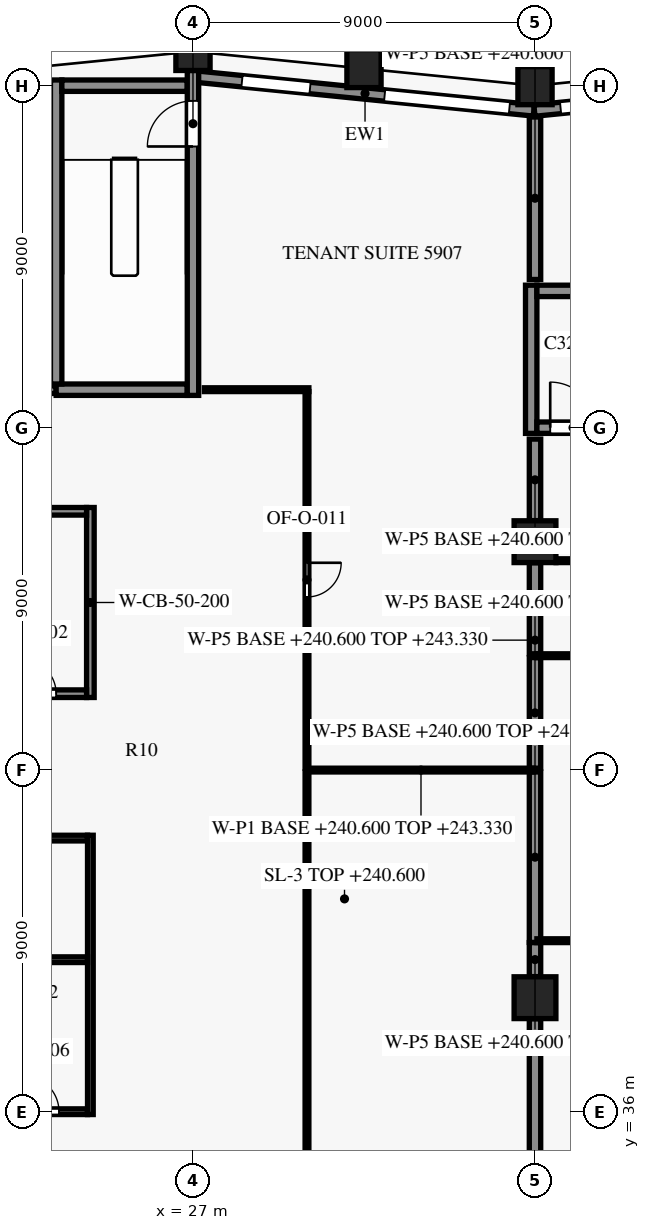
"""IFC4 building model, lengths in metres.
Left out: names, types, materials, properties, quantities, classifications, styles, units other than length and angle.
Written with IfcOpenShell. Run it as: python <this file> out.ifc"""

import sys

from ifc_helpers import new_model, si_unit, direction, frame, frame_2d, origin, origin_2d, place, context, subcontext, project, spatial, rectangle, extrude, element, fill, save


model = new_model("IFC4")
c1 = context("Model", 3, precision=1e-05, world=origin(), true_north=direction((0.0, 1.0)))
c2 = subcontext(c1, "Body", "Model", "MODEL_VIEW")
j1 = project(units=[si_unit("LENGTHUNIT", "METRE"), si_unit("PLANEANGLEUNIT", "RADIAN")], contexts=[c1])
p1 = place(None, origin())
s1 = spatial("IfcSite", under=j1, at=p1, CompositionType="ELEMENT")
p2 = place(p1, origin())
s2 = spatial("IfcBuilding", under=s1, at=p2, CompositionType="ELEMENT")
p3 = place(p2, frame((0.0, 0.0, 240.6)))
s3 = spatial("IfcBuildingStorey", under=s2, at=p3, CompositionType="ELEMENT", Elevation=240.6)
for number, where, z_axis, x_axis in (
    (1, (36.0, 63.0, 0.0), (0.0, 0.0, 1.0), (-1.0, 0.0, 0.0)),
    (2, (31.5, 63.45, 0.0), (0.0, 0.0, 1.0), (-0.995, 0.1, 0.0)),
    (3, (27.0, 63.9, 0.0), (0.0, 0.0, 1.0), (-1.0, 0.0, 0.0)),
):
    element("IfcColumn", number, at=place(p3, frame(where, z_axis=z_axis, x_axis=x_axis)), inside=s3, PredefinedType="COLUMN", context=c2, shape_type="SweptSolid", body=[
        extrude(rectangle(XDim=0.9, YDim=1.0, at=origin_2d()), origin(), (0.0, 0.0, 1.0), 3.8),
    ])
for number, where, z_axis, x_axis in (
    (4, (36.0, 39.0, 0.0), (0.0, 0.0, 1.0), (1.0, 0.0, 0.0)),
    (5, (36.0, 51.0, 0.0), (0.0, 0.0, 1.0), (1.0, 0.0, 0.0)),
):
    element("IfcColumn", number, at=place(p3, frame(where, z_axis=z_axis, x_axis=x_axis)), inside=s3, PredefinedType="COLUMN", context=c2, shape_type="SweptSolid", body=[
        extrude(rectangle(XDim=1.1, YDim=1.1, at=origin_2d()), origin(), (0.0, 0.0, 1.0), 3.8),
    ])
p4 = place(p3, frame((35.985, 62.345, 0.0), z_axis=(0.0, 0.0, 1.0), x_axis=(0.995035316196, 0.099522457379, 0.0)))
e6 = element("IfcWall", 6, at=p4, inside=s3, PredefinedType="SOLIDWALL", context=c2, shape_type="SweptSolid", body=[
    extrude(rectangle(XDim=9.03, YDim=0.3, at=frame_2d((4.515, 0.0))), origin(), (0.0, 0.0, 1.0), 3.15),
])
p5 = place(p4, frame((0.691, 0.0, 0.15)))
e7 = element("IfcOpeningElement", 7, at=p5, cuts=e6, PredefinedType="OPENING", context=c2, shape_type="SweptSolid", body=[
    extrude(rectangle(XDim=3.3, YDim=2.4, at=frame_2d((1.65, 1.2))), frame((0.0, 0.16, 0.0), z_axis=(0.0, -1.0, 0.0), x_axis=(1.0, 0.0, 0.0)), (0.0, 0.0, 1.0), 0.32),
])
p6 = place(p4, frame((5.964, 0.0, 0.75)))
e8 = element("IfcOpeningElement", 8, at=p6, cuts=e6, PredefinedType="OPENING", context=c2, shape_type="SweptSolid", body=[
    extrude(rectangle(XDim=1.8, YDim=1.8, at=frame_2d((0.9, 0.9))), frame((0.0, 0.16, 0.0), z_axis=(0.0, -1.0, 0.0), x_axis=(1.0, 0.0, 0.0)), (0.0, 0.0, 1.0), 0.32),
])
p7 = place(p3, frame((27.085, 63.238, 0.0), z_axis=(0.0, 0.0, 1.0), x_axis=(0.995035836657, -0.099517253618, 0.0)))
e9 = element("IfcWall", 9, at=p7, inside=s3, PredefinedType="SOLIDWALL", context=c2, shape_type="SweptSolid", body=[
    extrude(rectangle(XDim=8.93, YDim=0.3, at=frame_2d((4.465, 0.0))), origin(), (0.0, 0.0, 1.0), 3.15),
])
p8 = place(p7, frame((1.211, 0.0, 0.75)))
e10 = element("IfcOpeningElement", 10, at=p8, cuts=e9, PredefinedType="OPENING", context=c2, shape_type="SweptSolid", body=[
    extrude(rectangle(XDim=1.8, YDim=1.8, at=frame_2d((0.9, 0.9))), frame((0.0, 0.16, 0.0), z_axis=(0.0, -1.0, 0.0), x_axis=(1.0, 0.0, 0.0)), (0.0, 0.0, 1.0), 0.32),
])
p9 = place(p7, frame((4.984, 0.0, 0.15)))
e11 = element("IfcOpeningElement", 11, at=p9, cuts=e9, PredefinedType="OPENING", context=c2, shape_type="SweptSolid", body=[
    extrude(rectangle(XDim=3.3, YDim=2.4, at=frame_2d((1.65, 1.2))), frame((0.0, 0.16, 0.0), z_axis=(0.0, -1.0, 0.0), x_axis=(1.0, 0.0, 0.0)), (0.0, 0.0, 1.0), 0.32),
])
p10 = place(p3, frame((12.4, 36.0, 0.0), z_axis=(0.0, 0.0, 1.0), x_axis=(1.0, 0.0, 0.0)))
e12 = element("IfcWall", 12, at=p10, inside=s3, PredefinedType="SHEAR", context=c2, shape_type="SweptSolid", body=[
    extrude(rectangle(XDim=11.825, YDim=0.15, at=frame_2d((5.913, 0.0))), origin(), (0.0, 0.0, 1.0), 3.5),
])
p11 = place(p10, frame((1.05, 0.0, 0.0)))
e13 = element("IfcOpeningElement", 13, at=p11, cuts=e12, PredefinedType="OPENING", context=c2, shape_type="SweptSolid", body=[
    extrude(rectangle(XDim=0.9, YDim=2.1, at=frame_2d((0.45, 1.05))), frame((0.0, 0.085, 0.0), z_axis=(0.0, -1.0, 0.0), x_axis=(1.0, 0.0, 0.0)), (0.0, 0.0, 1.0), 0.17),
])
p12 = place(p10, frame((4.15, 0.0, 0.0)))
e14 = element("IfcOpeningElement", 14, at=p12, cuts=e12, PredefinedType="OPENING", context=c2, shape_type="SweptSolid", body=[
    extrude(rectangle(XDim=1.0, YDim=2.1, at=frame_2d((0.5, 1.05))), frame((0.0, 0.085, 0.0), z_axis=(0.0, -1.0, 0.0), x_axis=(1.0, 0.0, 0.0)), (0.0, 0.0, 1.0), 0.17),
])
p13 = place(p10, frame((7.35, 0.0, 0.0)))
e15 = element("IfcOpeningElement", 15, at=p13, cuts=e12, PredefinedType="OPENING", context=c2, shape_type="SweptSolid", body=[
    extrude(rectangle(XDim=0.9, YDim=2.1, at=frame_2d((0.45, 1.05))), frame((0.0, 0.085, 0.0), z_axis=(0.0, -1.0, 0.0), x_axis=(1.0, 0.0, 0.0)), (0.0, 0.0, 1.0), 0.17),
])
p14 = place(p10, frame((10.125, 0.0, 0.0)))
e16 = element("IfcOpeningElement", 16, at=p14, cuts=e12, PredefinedType="OPENING", context=c2, shape_type="SweptSolid", body=[
    extrude(rectangle(XDim=0.95, YDim=2.1, at=frame_2d((0.475, 1.05))), frame((0.0, 0.085, 0.0), z_axis=(0.0, -1.0, 0.0), x_axis=(1.0, 0.0, 0.0)), (0.0, 0.0, 1.0), 0.17),
])
p15 = place(p3, frame((8.1, 40.0, 0.0), z_axis=(0.0, 0.0, 1.0), x_axis=(1.0, 0.0, 0.0)))
e17 = element("IfcWall", 17, at=p15, inside=s3, PredefinedType="PARTITIONING", context=c2, shape_type="SweptSolid", body=[
    extrude(rectangle(XDim=16.125, YDim=0.15, at=frame_2d((8.062, 0.0))), origin(), (0.0, 0.0, 1.0), 3.5),
])
p16 = place(p3, frame((8.1, 43.2, 0.0), z_axis=(0.0, 0.0, 1.0), x_axis=(1.0, 0.0, 0.0)))
e18 = element("IfcWall", 18, at=p16, inside=s3, PredefinedType="PARTITIONING", context=c2, shape_type="SweptSolid", body=[
    extrude(rectangle(XDim=16.125, YDim=0.15, at=frame_2d((8.062, 0.0))), origin(), (0.0, 0.0, 1.0), 3.5),
])
p17 = place(p16, frame((1.575, 0.0, 0.0)))
e19 = element("IfcOpeningElement", 19, at=p17, cuts=e18, PredefinedType="OPENING", context=c2, shape_type="SweptSolid", body=[
    extrude(rectangle(XDim=0.9, YDim=2.1, at=frame_2d((0.45, 1.05))), frame((0.0, 0.085, 0.0), z_axis=(0.0, -1.0, 0.0), x_axis=(1.0, 0.0, 0.0)), (0.0, 0.0, 1.0), 0.17),
])
p18 = place(p16, frame((9.675, 0.0, 0.0)))
e20 = element("IfcOpeningElement", 20, at=p18, cuts=e18, PredefinedType="OPENING", context=c2, shape_type="SweptSolid", body=[
    extrude(rectangle(XDim=0.9, YDim=2.1, at=frame_2d((0.45, 1.05))), frame((0.0, 0.085, 0.0), z_axis=(0.0, -1.0, 0.0), x_axis=(1.0, 0.0, 0.0)), (0.0, 0.0, 1.0), 0.17),
])
p19 = place(p3, frame((21.6, 47.0, 0.0), z_axis=(0.0, 0.0, 1.0), x_axis=(1.0, 0.0, 0.0)))
e21 = element("IfcWall", 21, at=p19, inside=s3, PredefinedType="PARTITIONING", context=c2, shape_type="SweptSolid", body=[
    extrude(rectangle(XDim=2.6, YDim=0.2, at=frame_2d((1.3, 0.0))), origin(), (0.0, 0.0, 1.0), 3.5),
])
p20 = place(p19, frame((0.9, 0.0, 0.0)))
e22 = element("IfcOpeningElement", 22, at=p20, cuts=e21, PredefinedType="OPENING", context=c2, shape_type="SweptSolid", body=[
    extrude(rectangle(XDim=0.9, YDim=2.1, at=frame_2d((0.45, 1.05))), frame((0.0, 0.11, 0.0), z_axis=(0.0, -1.0, 0.0), x_axis=(1.0, 0.0, 0.0)), (0.0, 0.0, 1.0), 0.22),
])
p21 = place(p3, frame((21.6, 51.8, 0.0), z_axis=(0.0, 0.0, 1.0), x_axis=(1.0, 0.0, 0.0)))
e23 = element("IfcWall", 23, at=p21, inside=s3, PredefinedType="PARTITIONING", context=c2, shape_type="SweptSolid", body=[
    extrude(rectangle(XDim=2.6, YDim=0.2, at=frame_2d((1.3, 0.0))), origin(), (0.0, 0.0, 1.0), 3.5),
])
p22 = place(p3, frame((36.05, 54.0, 0.0), z_axis=(0.0, 0.0, 1.0), x_axis=(1.0, 0.0, 0.0)))
e24 = element("IfcWall", 24, at=p22, inside=s3, PredefinedType="SHEAR", context=c2, shape_type="SweptSolid", body=[
    extrude(rectangle(XDim=7.7, YDim=0.3, at=frame_2d((3.85, 0.0))), origin(), (0.0, 0.0, 1.0), 3.5),
])
p23 = place(p22, frame((0.35, 0.0, 0.0)))
e25 = element("IfcOpeningElement", 25, at=p23, cuts=e24, PredefinedType="OPENING", context=c2, shape_type="SweptSolid", body=[
    extrude(rectangle(XDim=1.2, YDim=2.2, at=frame_2d((0.6, 1.1))), frame((0.0, 0.16, 0.0), z_axis=(0.0, -1.0, 0.0), x_axis=(1.0, 0.0, 0.0)), (0.0, 0.0, 1.0), 0.32),
])
p24 = place(p3, frame((17.3, 55.0, 0.0), z_axis=(0.0, 0.0, 1.0), x_axis=(1.0, 0.0, 0.0)))
e26 = element("IfcWall", 26, at=p24, inside=s3, PredefinedType="PARTITIONING", context=c2, shape_type="SweptSolid", body=[
    extrude(rectangle(XDim=6.1, YDim=0.2, at=frame_2d((3.05, 0.0))), origin(), (0.0, 0.0, 1.0), 3.5),
])
p25 = place(p24, frame((2.55, 0.0, 0.0)))
e27 = element("IfcOpeningElement", 27, at=p25, cuts=e26, PredefinedType="OPENING", context=c2, shape_type="SweptSolid", body=[
    extrude(rectangle(XDim=1.0, YDim=2.1, at=frame_2d((0.5, 1.05))), frame((0.0, 0.11, 0.0), z_axis=(0.0, -1.0, 0.0), x_axis=(1.0, 0.0, 0.0)), (0.0, 0.0, 1.0), 0.22),
])
p26 = place(p3, frame((23.4, 55.0, 0.0), z_axis=(0.0, 0.0, 1.0), x_axis=(1.0, 0.0, 0.0)))
e28 = element("IfcWall", 28, at=p26, inside=s3, PredefinedType="SHEAR", context=c2, shape_type="SweptSolid", body=[
    extrude(rectangle(XDim=3.45, YDim=0.3, at=frame_2d((1.725, 0.0))), origin(), (0.0, 0.0, 1.0), 3.5),
])
p27 = place(p3, frame((36.05, 57.6, 0.0), z_axis=(0.0, 0.0, 1.0), x_axis=(1.0, 0.0, 0.0)))
e29 = element("IfcWall", 29, at=p27, inside=s3, PredefinedType="SHEAR", context=c2, shape_type="SweptSolid", body=[
    extrude(rectangle(XDim=7.7, YDim=0.3, at=frame_2d((3.85, 0.0))), origin(), (0.0, 0.0, 1.0), 3.5),
])
p28 = place(p3, frame((23.55, 63.0, 0.0), z_axis=(0.0, 0.0, 1.0), x_axis=(1.0, 0.0, 0.0)))
e30 = element("IfcWall", 30, at=p28, inside=s3, PredefinedType="SHEAR", context=c2, shape_type="SweptSolid", body=[
    extrude(rectangle(XDim=3.3, YDim=0.3, at=frame_2d((1.65, 0.0))), origin(), (0.0, 0.0, 1.0), 3.5),
])
p29 = place(p3, frame((23.4, 55.15, 0.0), z_axis=(0.0, 0.0, 1.0), x_axis=(0.0, 1.0, 0.0)))
e31 = element("IfcWall", 31, at=p29, inside=s3, PredefinedType="SHEAR", context=c2, shape_type="SweptSolid", body=[
    extrude(rectangle(XDim=8.0, YDim=0.3, at=frame_2d((4.0, 0.0))), origin(), (0.0, 0.0, 1.0), 3.5),
])
p30 = place(p3, frame((24.3, 35.925, 0.0), z_axis=(0.0, 0.0, 1.0), x_axis=(0.0, 1.0, 0.0)))
e32 = element("IfcWall", 32, at=p30, inside=s3, PredefinedType="PARTITIONING", context=c2, shape_type="SweptSolid", body=[
    extrude(rectangle(XDim=7.35, YDim=0.15, at=frame_2d((3.675, 0.0))), origin(), (0.0, 0.0, 1.0), 3.5),
])
p31 = place(p3, frame((24.3, 46.9, 0.0), z_axis=(0.0, 0.0, 1.0), x_axis=(0.0, 1.0, 0.0)))
e33 = element("IfcWall", 33, at=p31, inside=s3, PredefinedType="SHEAR", context=c2, shape_type="SweptSolid", body=[
    extrude(rectangle(XDim=5.0, YDim=0.2, at=frame_2d((2.5, 0.0))), origin(), (0.0, 0.0, 1.0), 3.5),
])
p32 = place(p3, frame((27.0, 54.85, 0.0), z_axis=(0.0, 0.0, 1.0), x_axis=(0.0, 1.0, 0.0)))
e34 = element("IfcWall", 34, at=p32, inside=s3, PredefinedType="SHEAR", context=c2, shape_type="SweptSolid", body=[
    extrude(rectangle(XDim=8.55, YDim=0.3, at=frame_2d((4.275, 0.0))), origin(), (0.0, 0.0, 1.0), 3.5),
])
p33 = place(p32, frame((6.55, 0.0, 0.0)))
e35 = element("IfcOpeningElement", 35, at=p33, cuts=e34, PredefinedType="OPENING", context=c2, shape_type="SweptSolid", body=[
    extrude(rectangle(XDim=1.2, YDim=2.2, at=frame_2d((0.6, 1.1))), frame((0.0, 0.16, 0.0), z_axis=(0.0, -1.0, 0.0), x_axis=(1.0, 0.0, 0.0)), (0.0, 0.0, 1.0), 0.32),
])
p34 = place(p3, frame((35.9, 53.85, 0.0), z_axis=(0.0, 0.0, 1.0), x_axis=(0.0, 1.0, 0.0)))
e36 = element("IfcWall", 36, at=p34, inside=s3, PredefinedType="SHEAR", context=c2, shape_type="SweptSolid", body=[
    extrude(rectangle(XDim=3.9, YDim=0.3, at=frame_2d((1.95, 0.0))), origin(), (0.0, 0.0, 1.0), 3.5),
])
p35 = place(p3, frame((36.0, 27.824, 0.0), z_axis=(0.0, 0.0, 1.0), x_axis=(0.0, 1.0, 0.0)))
e37 = element("IfcWall", 37, at=p35, inside=s3, PredefinedType="PARTITIONING", context=c2, shape_type="SweptSolid", body=[
    extrude(rectangle(XDim=10.621, YDim=0.3, at=frame_2d((5.311, 0.0))), origin(), (0.0, 0.0, 1.0), 2.73),
])
p36 = place(p3, frame((36.0, 39.555, 0.0), z_axis=(0.0, 0.0, 1.0), x_axis=(0.0, 1.0, 0.0)))
e38 = element("IfcWall", 38, at=p36, inside=s3, PredefinedType="PARTITIONING", context=c2, shape_type="SweptSolid", body=[
    extrude(rectangle(XDim=0.895, YDim=0.3, at=frame_2d((0.448, 0.0))), origin(), (0.0, 0.0, 1.0), 2.73),
])
p37 = place(p3, frame((49.45, 40.5, 0.0), z_axis=(0.0, 0.0, 1.0), x_axis=(-1.0, 0.0, 0.0)))
e39 = element("IfcWall", 39, at=p37, inside=s3, PredefinedType="PARTITIONING", context=c2, shape_type="SweptSolid", body=[
    extrude(rectangle(XDim=13.4, YDim=0.1, at=frame_2d((6.7, 0.0))), origin(), (0.0, 0.0, 1.0), 2.73),
])
p38 = place(p37, frame((8.05, 0.0, 0.0)))
e40 = element("IfcOpeningElement", 40, at=p38, cuts=e39, PredefinedType="OPENING", context=c2, shape_type="SweptSolid", body=[
    extrude(rectangle(XDim=1.8, YDim=2.1, at=frame_2d((0.9, 1.05))), frame((0.0, 0.06, 0.0), z_axis=(0.0, -1.0, 0.0), x_axis=(1.0, 0.0, 0.0)), (0.0, 0.0, 1.0), 0.12),
])
p39 = place(p3, frame((36.0, 40.455, 0.0), z_axis=(0.0, 0.0, 1.0), x_axis=(0.0, 1.0, 0.0)))
e41 = element("IfcWall", 41, at=p39, inside=s3, PredefinedType="PARTITIONING", context=c2, shape_type="SweptSolid", body=[
    extrude(rectangle(XDim=4.485, YDim=0.3, at=frame_2d((2.242, 0.0))), origin(), (0.0, 0.0, 1.0), 2.73),
])
p40 = place(p3, frame((30.0, 44.94, 0.0), z_axis=(0.0, 0.0, 1.0), x_axis=(0.0, -1.0, 0.0)))
e42 = element("IfcWall", 42, at=p40, inside=s3, PredefinedType="PARTITIONING", context=c2, shape_type="SweptSolid", body=[
    extrude(rectangle(XDim=11.89, YDim=0.1, at=frame_2d((5.945, 0.0))), origin(), (0.0, 0.0, 1.0), 3.33),
])
p41 = place(p3, frame((30.05, 44.99, 0.0), z_axis=(0.0, 0.0, 1.0), x_axis=(1.0, 0.0, 0.0)))
e43 = element("IfcWall", 43, at=p41, inside=s3, PredefinedType="PARTITIONING", context=c2, shape_type="SweptSolid", body=[
    extrude(rectangle(XDim=5.9, YDim=0.1, at=frame_2d((2.95, 0.0))), origin(), (0.0, 0.0, 1.0), 2.73),
])
p42 = place(p3, frame((36.0, 45.04, 0.0), z_axis=(0.0, 0.0, 1.0), x_axis=(0.0, 1.0, 0.0)))
e44 = element("IfcWall", 44, at=p42, inside=s3, PredefinedType="PARTITIONING", context=c2, shape_type="SweptSolid", body=[
    extrude(rectangle(XDim=2.91, YDim=0.3, at=frame_2d((1.455, 0.0))), origin(), (0.0, 0.0, 1.0), 2.73),
])
p43 = place(p3, frame((36.05, 48.0, 0.0), z_axis=(0.0, 0.0, 1.0), x_axis=(1.0, 0.0, 0.0)))
e45 = element("IfcWall", 45, at=p43, inside=s3, PredefinedType="PARTITIONING", context=c2, shape_type="SweptSolid", body=[
    extrude(rectangle(XDim=3.75, YDim=0.1, at=frame_2d((1.875, 0.0))), origin(), (0.0, 0.0, 1.0), 2.73),
])
p44 = place(p43, frame((1.4, 0.0, 0.0)))
e46 = element("IfcOpeningElement", 46, at=p44, cuts=e45, PredefinedType="OPENING", context=c2, shape_type="SweptSolid", body=[
    extrude(rectangle(XDim=0.9, YDim=2.1, at=frame_2d((0.45, 1.05))), frame((0.0, 0.06, 0.0), z_axis=(0.0, -1.0, 0.0), x_axis=(1.0, 0.0, 0.0)), (0.0, 0.0, 1.0), 0.12),
])
p45 = place(p3, frame((36.0, 48.05, 0.0), z_axis=(0.0, 0.0, 1.0), x_axis=(0.0, 1.0, 0.0)))
e47 = element("IfcWall", 47, at=p45, inside=s3, PredefinedType="PARTITIONING", context=c2, shape_type="SweptSolid", body=[
    extrude(rectangle(XDim=2.395, YDim=0.3, at=frame_2d((1.198, 0.0))), origin(), (0.0, 0.0, 1.0), 2.73),
])
p46 = place(p3, frame((44.445, 50.5, 0.0), z_axis=(0.0, 0.0, 1.0), x_axis=(-1.0, 0.0, 0.0)))
e48 = element("IfcWall", 48, at=p46, inside=s3, PredefinedType="PARTITIONING", context=c2, shape_type="SweptSolid", body=[
    extrude(rectangle(XDim=7.89, YDim=0.1, at=frame_2d((3.945, 0.0))), origin(), (0.0, 0.0, 1.0), 3.33),
])
p47 = place(p3, frame((36.0, 51.555, 0.0), z_axis=(0.0, 0.0, 1.0), x_axis=(0.0, 1.0, 0.0)))
e49 = element("IfcWall", 49, at=p47, inside=s3, PredefinedType="PARTITIONING", context=c2, shape_type="SweptSolid", body=[
    extrude(rectangle(XDim=2.145, YDim=0.3, at=frame_2d((1.073, 0.0))), origin(), (0.0, 0.0, 1.0), 2.73),
])
p48 = place(p3, frame((30.0, 54.95, 0.0), z_axis=(0.0, 0.0, 1.0), x_axis=(0.0, -1.0, 0.0)))
e50 = element("IfcWall", 50, at=p48, inside=s3, PredefinedType="PARTITIONING", context=c2, shape_type="SweptSolid", body=[
    extrude(rectangle(XDim=9.91, YDim=0.1, at=frame_2d((4.955, 0.0))), origin(), (0.0, 0.0, 1.0), 3.33),
])
p49 = place(p48, frame((4.505, 0.0, 0.0)))
e51 = element("IfcOpeningElement", 51, at=p49, cuts=e50, PredefinedType="OPENING", context=c2, shape_type="SweptSolid", body=[
    extrude(rectangle(XDim=0.9, YDim=2.1, at=frame_2d((0.45, 1.05))), frame((0.0, 0.06, 0.0), z_axis=(0.0, -1.0, 0.0), x_axis=(1.0, 0.0, 0.0)), (0.0, 0.0, 1.0), 0.12),
])
p50 = place(p3, frame((27.3, 55.0, 0.0), z_axis=(0.0, 0.0, 1.0), x_axis=(1.0, 0.0, 0.0)))
e52 = element("IfcWall", 52, at=p50, inside=s3, PredefinedType="PARTITIONING", context=c2, shape_type="SweptSolid", body=[
    extrude(rectangle(XDim=2.75, YDim=0.1, at=frame_2d((1.375, 0.0))), origin(), (0.0, 0.0, 1.0), 3.33),
])
p51 = place(p3, frame((36.0, 57.9, 0.0), z_axis=(0.0, 0.0, 1.0), x_axis=(0.0, 1.0, 0.0)))
e53 = element("IfcWall", 53, at=p51, inside=s3, PredefinedType="PARTITIONING", context=c2, shape_type="SweptSolid", body=[
    extrude(rectangle(XDim=4.276, YDim=0.3, at=frame_2d((2.138, 0.0))), origin(), (0.0, 0.0, 1.0), 2.73),
])
p52 = place(p5, origin())
e54 = element("IfcWindow", 54, at=p52, inside=s3, PartitioningType="SINGLE_PANEL", PredefinedType="WINDOW", context=c2, shape_type="SweptSolid", body=[
    extrude(rectangle(XDim=3.3, YDim=2.4, at=frame_2d((1.65, 1.2))), frame((0.0, 0.03, 0.0), z_axis=(0.0, -1.0, 0.0), x_axis=(1.0, 0.0, 0.0)), (0.0, 0.0, 1.0), 0.06),
])
fill(e7, e54)
p53 = place(p8, origin())
e55 = element("IfcWindow", 55, at=p53, inside=s3, PartitioningType="SINGLE_PANEL", PredefinedType="WINDOW", context=c2, shape_type="SweptSolid", body=[
    extrude(rectangle(XDim=1.8, YDim=1.8, at=frame_2d((0.9, 0.9))), frame((0.0, 0.03, 0.0), z_axis=(0.0, -1.0, 0.0), x_axis=(1.0, 0.0, 0.0)), (0.0, 0.0, 1.0), 0.06),
])
fill(e10, e55)
p54 = place(p9, origin())
e56 = element("IfcWindow", 56, at=p54, inside=s3, PartitioningType="SINGLE_PANEL", PredefinedType="WINDOW", context=c2, shape_type="SweptSolid", body=[
    extrude(rectangle(XDim=3.3, YDim=2.4, at=frame_2d((1.65, 1.2))), frame((0.0, 0.03, 0.0), z_axis=(0.0, -1.0, 0.0), x_axis=(1.0, 0.0, 0.0)), (0.0, 0.0, 1.0), 0.06),
])
fill(e11, e56)
p55 = place(p20, origin())
e57 = element("IfcDoor", 57, at=p55, inside=s3, OperationType="SINGLE_SWING_LEFT", PredefinedType="DOOR", context=c2, shape_type="SweptSolid", body=[
    extrude(rectangle(XDim=0.9, YDim=2.1, at=frame_2d((0.45, 1.05))), frame((0.0, 0.025, 0.0), z_axis=(0.0, -1.0, 0.0), x_axis=(1.0, 0.0, 0.0)), (0.0, 0.0, 1.0), 0.05),
])
fill(e22, e57)
p56 = place(p14, origin())
e58 = element("IfcDoor", 58, at=p56, inside=s3, OperationType="SINGLE_SWING_LEFT", PredefinedType="DOOR", context=c2, shape_type="SweptSolid", body=[
    extrude(rectangle(XDim=0.95, YDim=2.1, at=frame_2d((0.475, 1.05))), frame((0.0, 0.025, 0.0), z_axis=(0.0, -1.0, 0.0), x_axis=(1.0, 0.0, 0.0)), (0.0, 0.0, 1.0), 0.05),
])
fill(e16, e58)
p57 = place(p33, origin())
e59 = element("IfcDoor", 59, at=p57, inside=s3, OperationType="SINGLE_SWING_LEFT", PredefinedType="DOOR", context=c2, shape_type="SweptSolid", body=[
    extrude(rectangle(XDim=1.2, YDim=2.2, at=frame_2d((0.6, 1.1))), frame((0.0, 0.025, 0.0), z_axis=(0.0, -1.0, 0.0), x_axis=(1.0, 0.0, 0.0)), (0.0, 0.0, 1.0), 0.05),
])
fill(e35, e59)
p58 = place(p23, origin())
e60 = element("IfcDoor", 60, at=p58, inside=s3, OperationType="SINGLE_SWING_LEFT", PredefinedType="DOOR", context=c2, shape_type="SweptSolid", body=[
    extrude(rectangle(XDim=1.2, YDim=2.2, at=frame_2d((0.6, 1.1))), frame((0.0, 0.025, 0.0), z_axis=(0.0, -1.0, 0.0), x_axis=(1.0, 0.0, 0.0)), (0.0, 0.0, 1.0), 0.05),
])
fill(e25, e60)
p59 = place(p49, origin())
e61 = element("IfcDoor", 61, at=p59, inside=s3, OperationType="SINGLE_SWING_LEFT", PredefinedType="DOOR", context=c2, shape_type="SweptSolid", body=[
    extrude(rectangle(XDim=0.9, YDim=2.1, at=frame_2d((0.45, 1.05))), frame((0.0, 0.025, 0.0), z_axis=(0.0, -1.0, 0.0), x_axis=(1.0, 0.0, 0.0)), (0.0, 0.0, 1.0), 0.05),
])
fill(e51, e61)
save(model, sys.argv[1])
